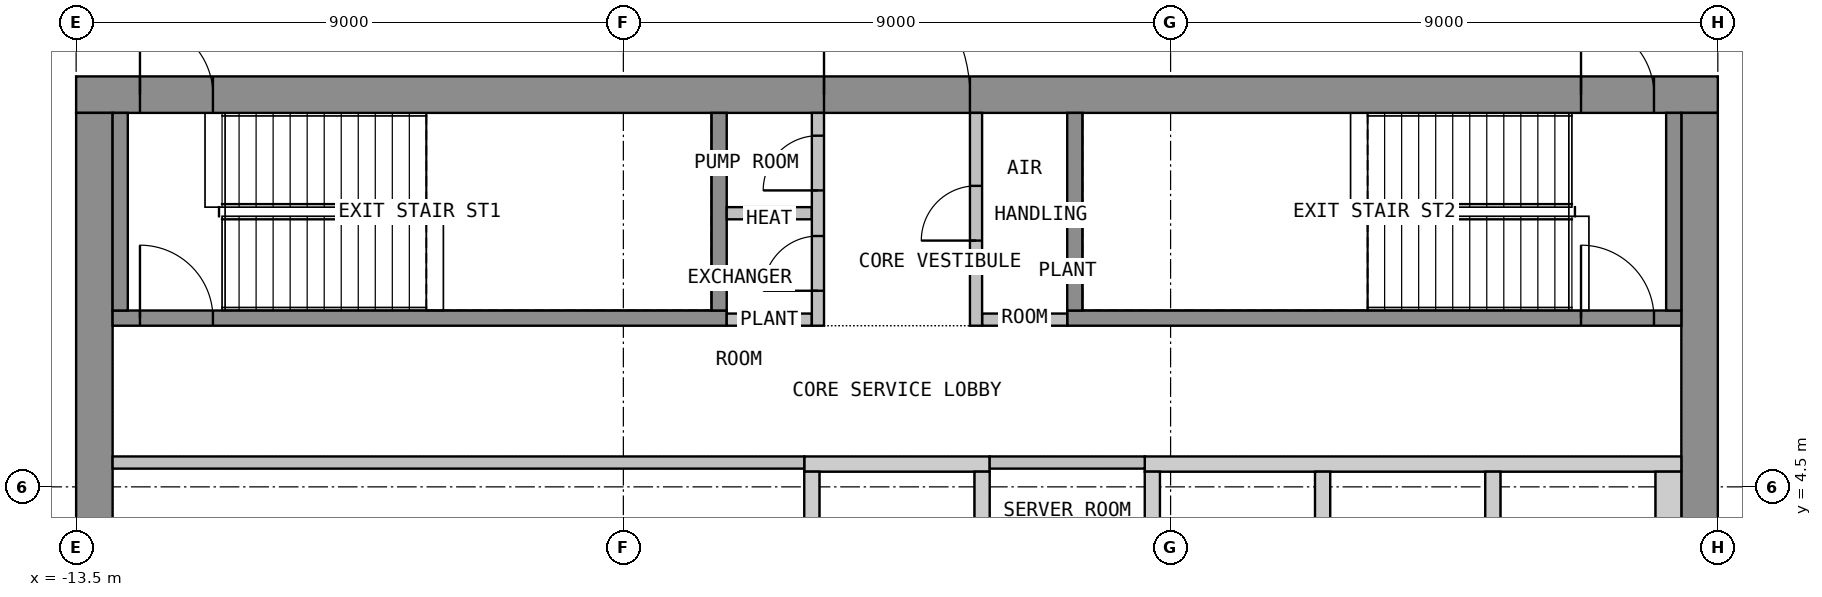
"""IFC4 building model, lengths in metres.
Left out: names, types, materials, properties, quantities, classifications, styles, units other than length and angle.
Written with IfcOpenShell. Run it as: python <this file> out.ifc"""

import sys

from ifc_helpers import new_model, si_unit, direction, frame, frame_2d, origin, place, context, subcontext, project, spatial, polyline, rectangle, outline, extrude, element, fill, save


model = new_model("IFC4")
c1 = context("Model", 3, precision=1e-05, world=origin(), true_north=direction((0.0, 1.0)))
c2 = subcontext(c1, "Body", "Model", "MODEL_VIEW")
j1 = project(units=[si_unit("LENGTHUNIT", "METRE"), si_unit("PLANEANGLEUNIT", "RADIAN")], contexts=[c1])
p1 = place(None, origin())
s1 = spatial("IfcSite", under=j1, at=p1, CompositionType="ELEMENT")
p2 = place(p1, origin())
s2 = spatial("IfcBuilding", under=s1, at=p2, CompositionType="ELEMENT")
p3 = place(p2, frame((0.0, 0.0, 179.4)))
s3 = spatial("IfcBuildingStorey", under=s2, at=p3, CompositionType="ELEMENT", Elevation=179.4)
p4 = place(p3, frame((-13.5, 10.95, 0.0), z_axis=(0.0, 0.0, 1.0), x_axis=(1.0, 0.0, 0.0)))
e1 = element("IfcWall", 1, at=p4, inside=s3, PredefinedType="SHEAR", context=c2, shape_type="SweptSolid", body=[
    extrude(rectangle(XDim=27.0, YDim=0.6, at=frame_2d((13.5, 0.0))), origin(), (0.0, 0.0, 1.0), 4.15),
])
p5 = place(p4, frame((12.3, 0.0, 0.0)))
e2 = element("IfcOpeningElement", 2, at=p5, cuts=e1, PredefinedType="OPENING", context=c2, shape_type="SweptSolid", body=[
    extrude(rectangle(XDim=2.4, YDim=2.1, at=frame_2d((1.2, 1.05))), frame((0.0, 0.31, 0.0), z_axis=(0.0, -1.0, 0.0), x_axis=(1.0, 0.0, 0.0)), (0.0, 0.0, 1.0), 0.62),
])
p6 = place(p4, frame((1.05, 0.0, 0.0)))
e3 = element("IfcOpeningElement", 3, at=p6, cuts=e1, PredefinedType="OPENING", context=c2, shape_type="SweptSolid", body=[
    extrude(rectangle(XDim=1.2, YDim=2.1, at=frame_2d((0.6, 1.05))), frame((0.0, 0.31, 0.0), z_axis=(0.0, -1.0, 0.0), x_axis=(1.0, 0.0, 0.0)), (0.0, 0.0, 1.0), 0.62),
])
p7 = place(p4, frame((24.75, 0.0, 0.0)))
e4 = element("IfcOpeningElement", 4, at=p7, cuts=e1, PredefinedType="OPENING", context=c2, shape_type="SweptSolid", body=[
    extrude(rectangle(XDim=1.2, YDim=2.1, at=frame_2d((0.6, 1.05))), frame((0.0, 0.31, 0.0), z_axis=(0.0, -1.0, 0.0), x_axis=(1.0, 0.0, 0.0)), (0.0, 0.0, 1.0), 0.62),
])
p8 = place(p3, frame((-13.2, -10.65, 0.0), z_axis=(0.0, 0.0, 1.0), x_axis=(0.0, 1.0, 0.0)))
e5 = element("IfcWall", 5, at=p8, inside=s3, PredefinedType="SHEAR", context=c2, shape_type="SweptSolid", body=[
    extrude(rectangle(XDim=21.3, YDim=0.6, at=frame_2d((10.65, 0.0))), origin(), (0.0, 0.0, 1.0), 4.15),
])
p9 = place(p8, frame((9.45, 0.0, 0.0)))
e6 = element("IfcOpeningElement", 6, at=p9, cuts=e5, PredefinedType="OPENING", context=c2, shape_type="SweptSolid", body=[
    extrude(rectangle(XDim=2.4, YDim=2.1, at=frame_2d((1.2, 1.05))), frame((0.0, 0.31, 0.0), z_axis=(0.0, -1.0, 0.0), x_axis=(1.0, 0.0, 0.0)), (0.0, 0.0, 1.0), 0.62),
])
p10 = place(p3, frame((13.2, -10.65, 0.0), z_axis=(0.0, 0.0, 1.0), x_axis=(0.0, 1.0, 0.0)))
e7 = element("IfcWall", 7, at=p10, inside=s3, PredefinedType="SHEAR", context=c2, shape_type="SweptSolid", body=[
    extrude(rectangle(XDim=21.3, YDim=0.6, at=frame_2d((10.65, 0.0))), origin(), (0.0, 0.0, 1.0), 4.15),
])
p11 = place(p10, frame((9.45, 0.0, 0.0)))
e8 = element("IfcOpeningElement", 8, at=p11, cuts=e7, PredefinedType="OPENING", context=c2, shape_type="SweptSolid", body=[
    extrude(rectangle(XDim=2.4, YDim=2.1, at=frame_2d((1.2, 1.05))), frame((0.0, 0.31, 0.0), z_axis=(0.0, -1.0, 0.0), x_axis=(1.0, 0.0, 0.0)), (0.0, 0.0, 1.0), 0.62),
])
p12 = place(p3, origin())
e9 = element("IfcWall", 9, at=p12, inside=s3, PredefinedType="SHEAR", context=c2, shape_type="SweptSolid", body=[
    extrude(outline(polyline([(-1.525, 4.75), (1.525, 4.75), (1.525, 5.0), (-1.525, 5.0), (-1.525, 4.75)])), origin(), (0.0, 0.0, 1.0), 4.15),
])
p13 = place(p3, origin())
e10 = element("IfcWall", 10, at=p13, inside=s3, PredefinedType="SHEAR", context=c2, shape_type="SweptSolid", body=[
    extrude(outline(polyline([(4.075, 4.75), (12.9, 4.75), (12.9, 5.0), (4.075, 5.0), (4.075, 4.75)])), origin(), (0.0, 0.0, 1.0), 4.15),
])
p14 = place(p3, origin())
e11 = element("IfcWall", 11, at=p14, inside=s3, PredefinedType="SHEAR", context=c2, shape_type="SweptSolid", body=[
    extrude(outline(polyline([(-1.525, 2.05), (-1.275, 2.05), (-1.275, 4.75), (-1.525, 4.75), (-1.525, 2.05)])), origin(), (0.0, 0.0, 1.0), 4.15),
])
p15 = place(p3, origin())
e12 = element("IfcWall", 12, at=p15, inside=s3, PredefinedType="SHEAR", context=c2, shape_type="SweptSolid", body=[
    extrude(outline(polyline([(1.275, 2.05), (1.525, 2.05), (1.525, 4.75), (1.275, 4.75), (1.275, 2.05)])), origin(), (0.0, 0.0, 1.0), 4.15),
])
p16 = place(p3, origin())
e13 = element("IfcWall", 13, at=p16, inside=s3, PredefinedType="SHEAR", context=c2, shape_type="SweptSolid", body=[
    extrude(outline(polyline([(9.675, 2.05), (9.925, 2.05), (9.925, 4.75), (9.675, 4.75), (9.675, 2.05)])), origin(), (0.0, 0.0, 1.0), 4.15),
])
p17 = place(p3, origin())
e14 = element("IfcWall", 14, at=p17, inside=s3, PredefinedType="SHEAR", context=c2, shape_type="SweptSolid", body=[
    extrude(outline(polyline([(12.475, 2.05), (12.9, 2.05), (12.9, 4.75), (12.475, 4.75), (12.475, 2.05)])), origin(), (0.0, 0.0, 1.0), 4.15),
])
p18 = place(p3, origin())
e15 = element("IfcWall", 15, at=p18, inside=s3, PredefinedType="SHEAR", context=c2, shape_type="SweptSolid", body=[
    extrude(outline(polyline([(4.075, 3.05), (4.325, 3.05), (4.325, 4.75), (4.075, 4.75), (4.075, 3.05)])), origin(), (0.0, 0.0, 1.0), 4.15),
])
p19 = place(p3, origin())
e16 = element("IfcWall", 16, at=p19, inside=s3, PredefinedType="SHEAR", context=c2, shape_type="SweptSolid", body=[
    extrude(outline(polyline([(6.875, 3.05), (7.125, 3.05), (7.125, 4.75), (6.875, 4.75), (6.875, 3.05)])), origin(), (0.0, 0.0, 1.0), 4.15),
])
p20 = place(p3, frame((-12.9, 7.275, 0.0), z_axis=(0.0, 0.0, 1.0), x_axis=(1.0, 0.0, 0.0)))
e17 = element("IfcWall", 17, at=p20, inside=s3, PredefinedType="SHEAR", context=c2, shape_type="SweptSolid", body=[
    extrude(rectangle(XDim=10.1, YDim=0.25, at=frame_2d((5.05, 0.0))), origin(), (0.0, 0.0, 1.0), 4.15),
])
p21 = place(p20, frame((0.45, 0.0, 0.0)))
e18 = element("IfcOpeningElement", 18, at=p21, cuts=e17, PredefinedType="OPENING", context=c2, shape_type="SweptSolid", body=[
    extrude(rectangle(XDim=1.2, YDim=2.1, at=frame_2d((0.6, 1.05))), frame((0.0, 0.135, 0.0), z_axis=(0.0, -1.0, 0.0), x_axis=(1.0, 0.0, 0.0)), (0.0, 0.0, 1.0), 0.27),
])
for number, where, z_axis, x_axis in (
    (19, (-12.775, 7.4, 0.0), (0.0, 0.0, 1.0), (0.0, 1.0, 0.0)),
    (20, (-2.925, 7.4, 0.0), (0.0, 0.0, 1.0), (0.0, 1.0, 0.0)),
):
    element("IfcWall", number, at=place(p3, frame(where, z_axis=z_axis, x_axis=x_axis)), inside=s3, PredefinedType="SHEAR", context=c2, shape_type="SweptSolid", body=[
        extrude(rectangle(XDim=3.25, YDim=0.25, at=frame_2d((1.625, 0.0))), origin(), (0.0, 0.0, 1.0), 4.15),
    ])
p22 = place(p3, frame((2.8, 7.275, 0.0), z_axis=(0.0, 0.0, 1.0), x_axis=(1.0, 0.0, 0.0)))
e21 = element("IfcWall", 21, at=p22, inside=s3, PredefinedType="SHEAR", context=c2, shape_type="SweptSolid", body=[
    extrude(rectangle(XDim=10.1, YDim=0.25, at=frame_2d((5.05, 0.0))), origin(), (0.0, 0.0, 1.0), 4.15),
])
p23 = place(p22, frame((8.45, 0.0, 0.0)))
e22 = element("IfcOpeningElement", 22, at=p23, cuts=e21, PredefinedType="OPENING", context=c2, shape_type="SweptSolid", body=[
    extrude(rectangle(XDim=1.2, YDim=2.1, at=frame_2d((0.6, 1.05))), frame((0.0, 0.135, 0.0), z_axis=(0.0, -1.0, 0.0), x_axis=(1.0, 0.0, 0.0)), (0.0, 0.0, 1.0), 0.27),
])
for number, where, z_axis, x_axis in (
    (23, (2.925, 7.4, 0.0), (0.0, 0.0, 1.0), (0.0, 1.0, 0.0)),
    (24, (12.775, 7.4, 0.0), (0.0, 0.0, 1.0), (0.0, 1.0, 0.0)),
):
    element("IfcWall", number, at=place(p3, frame(where, z_axis=z_axis, x_axis=x_axis)), inside=s3, PredefinedType="SHEAR", context=c2, shape_type="SweptSolid", body=[
        extrude(rectangle(XDim=3.25, YDim=0.25, at=frame_2d((1.625, 0.0))), origin(), (0.0, 0.0, 1.0), 4.15),
    ])
for number, where, z_axis, x_axis in (
    (25, (-2.8, 7.25, 0.0), (0.0, 0.0, 1.0), (1.0, 0.0, 0.0)),
    (26, (-2.8, 9.0, 0.0), (0.0, 0.0, 1.0), (1.0, 0.0, 0.0)),
    (27, (1.4, 7.25, 0.0), (0.0, 0.0, 1.0), (1.0, 0.0, 0.0)),
):
    element("IfcWall", number, at=place(p3, frame(where, z_axis=z_axis, x_axis=x_axis)), inside=s3, PredefinedType="PARTITIONING", context=c2, shape_type="SweptSolid", body=[
        extrude(rectangle(XDim=1.4, YDim=0.2, at=frame_2d((0.7, 0.0))), origin(), (0.0, 0.0, 1.0), 4.15),
    ])
p24 = place(p3, frame((-1.3, 7.15, 0.0), z_axis=(0.0, 0.0, 1.0), x_axis=(0.0, 1.0, 0.0)))
e28 = element("IfcWall", 28, at=p24, inside=s3, PredefinedType="PARTITIONING", context=c2, shape_type="SweptSolid", body=[
    extrude(rectangle(XDim=3.5, YDim=0.2, at=frame_2d((1.75, 0.0))), origin(), (0.0, 0.0, 1.0), 4.15),
])
p25 = place(p24, frame((0.575, 0.0, 0.0)))
e29 = element("IfcOpeningElement", 29, at=p25, cuts=e28, PredefinedType="OPENING", context=c2, shape_type="SweptSolid", body=[
    extrude(rectangle(XDim=0.9, YDim=2.1, at=frame_2d((0.45, 1.05))), frame((0.0, 0.11, 0.0), z_axis=(0.0, -1.0, 0.0), x_axis=(1.0, 0.0, 0.0)), (0.0, 0.0, 1.0), 0.22),
])
p26 = place(p24, frame((2.225, 0.0, 0.0)))
e30 = element("IfcOpeningElement", 30, at=p26, cuts=e28, PredefinedType="OPENING", context=c2, shape_type="SweptSolid", body=[
    extrude(rectangle(XDim=0.9, YDim=2.1, at=frame_2d((0.45, 1.05))), frame((0.0, 0.11, 0.0), z_axis=(0.0, -1.0, 0.0), x_axis=(1.0, 0.0, 0.0)), (0.0, 0.0, 1.0), 0.22),
])
p27 = place(p3, frame((1.3, 7.15, 0.0), z_axis=(0.0, 0.0, 1.0), x_axis=(0.0, 1.0, 0.0)))
e31 = element("IfcWall", 31, at=p27, inside=s3, PredefinedType="PARTITIONING", context=c2, shape_type="SweptSolid", body=[
    extrude(rectangle(XDim=3.5, YDim=0.2, at=frame_2d((1.75, 0.0))), origin(), (0.0, 0.0, 1.0), 4.15),
])
p28 = place(p27, frame((1.4, 0.0, 0.0)))
e32 = element("IfcOpeningElement", 32, at=p28, cuts=e31, PredefinedType="OPENING", context=c2, shape_type="SweptSolid", body=[
    extrude(rectangle(XDim=0.9, YDim=2.1, at=frame_2d((0.45, 1.05))), frame((0.0, 0.11, 0.0), z_axis=(0.0, -1.0, 0.0), x_axis=(1.0, 0.0, 0.0)), (0.0, 0.0, 1.0), 0.22),
])
p29 = place(p3, frame((-12.9, 4.9, 0.0), z_axis=(0.0, 0.0, 1.0), x_axis=(1.0, 0.0, 0.0)))
e33 = element("IfcWall", 33, at=p29, inside=s3, PredefinedType="PARTITIONING", context=c2, shape_type="SweptSolid", body=[
    extrude(rectangle(XDim=11.375, YDim=0.2, at=frame_2d((5.688, 0.0))), origin(), (0.0, 0.0, 1.0), 4.15),
])
p30 = place(p3, frame((1.525, 4.9, 0.0), z_axis=(0.0, 0.0, 1.0), x_axis=(1.0, 0.0, 0.0)))
e34 = element("IfcWall", 34, at=p30, inside=s3, PredefinedType="PARTITIONING", context=c2, shape_type="SweptSolid", body=[
    extrude(rectangle(XDim=2.55, YDim=0.2, at=frame_2d((1.275, 0.0))), origin(), (0.0, 0.0, 1.0), 4.15),
])
p31 = place(p5, origin())
e35 = element("IfcDoor", 35, at=p31, inside=s3, OperationType="DOUBLE_DOOR_DOUBLE_SWING", PredefinedType="DOOR", context=c2, shape_type="SweptSolid", body=[
    extrude(rectangle(XDim=2.4, YDim=2.1, at=frame_2d((1.2, 1.05))), frame((0.0, 0.025, 0.0), z_axis=(0.0, -1.0, 0.0), x_axis=(1.0, 0.0, 0.0)), (0.0, 0.0, 1.0), 0.05),
])
fill(e2, e35)
p32 = place(p6, origin())
e36 = element("IfcDoor", 36, at=p32, inside=s3, OperationType="SINGLE_SWING_RIGHT", PredefinedType="DOOR", context=c2, shape_type="SweptSolid", body=[
    extrude(rectangle(XDim=1.2, YDim=2.1, at=frame_2d((0.6, 1.05))), frame((0.0, 0.025, 0.0), z_axis=(0.0, -1.0, 0.0), x_axis=(1.0, 0.0, 0.0)), (0.0, 0.0, 1.0), 0.05),
])
fill(e3, e36)
p33 = place(p7, origin())
e37 = element("IfcDoor", 37, at=p33, inside=s3, OperationType="SINGLE_SWING_RIGHT", PredefinedType="DOOR", context=c2, shape_type="SweptSolid", body=[
    extrude(rectangle(XDim=1.2, YDim=2.1, at=frame_2d((0.6, 1.05))), frame((0.0, 0.025, 0.0), z_axis=(0.0, -1.0, 0.0), x_axis=(1.0, 0.0, 0.0)), (0.0, 0.0, 1.0), 0.05),
])
fill(e4, e37)
p34 = place(p21, origin())
e38 = element("IfcDoor", 38, at=p34, inside=s3, OperationType="SINGLE_SWING_LEFT", PredefinedType="DOOR", context=c2, shape_type="SweptSolid", body=[
    extrude(rectangle(XDim=1.2, YDim=2.1, at=frame_2d((0.6, 1.05))), frame((0.0, 0.025, 0.0), z_axis=(0.0, -1.0, 0.0), x_axis=(1.0, 0.0, 0.0)), (0.0, 0.0, 1.0), 0.05),
])
fill(e18, e38)
p35 = place(p23, origin())
e39 = element("IfcDoor", 39, at=p35, inside=s3, OperationType="SINGLE_SWING_LEFT", PredefinedType="DOOR", context=c2, shape_type="SweptSolid", body=[
    extrude(rectangle(XDim=1.2, YDim=2.1, at=frame_2d((0.6, 1.05))), frame((0.0, 0.025, 0.0), z_axis=(0.0, -1.0, 0.0), x_axis=(1.0, 0.0, 0.0)), (0.0, 0.0, 1.0), 0.05),
])
fill(e22, e39)
p36 = place(p25, origin())
e40 = element("IfcDoor", 40, at=p36, inside=s3, OperationType="SINGLE_SWING_LEFT", PredefinedType="DOOR", context=c2, shape_type="SweptSolid", body=[
    extrude(rectangle(XDim=0.9, YDim=2.1, at=frame_2d((0.45, 1.05))), frame((0.0, 0.025, 0.0), z_axis=(0.0, -1.0, 0.0), x_axis=(1.0, 0.0, 0.0)), (0.0, 0.0, 1.0), 0.05),
])
fill(e29, e40)
p37 = place(p26, origin())
e41 = element("IfcDoor", 41, at=p37, inside=s3, OperationType="SINGLE_SWING_LEFT", PredefinedType="DOOR", context=c2, shape_type="SweptSolid", body=[
    extrude(rectangle(XDim=0.9, YDim=2.1, at=frame_2d((0.45, 1.05))), frame((0.0, 0.025, 0.0), z_axis=(0.0, -1.0, 0.0), x_axis=(1.0, 0.0, 0.0)), (0.0, 0.0, 1.0), 0.05),
])
fill(e30, e41)
p38 = place(p28, origin())
e42 = element("IfcDoor", 42, at=p38, inside=s3, OperationType="SINGLE_SWING_LEFT", PredefinedType="DOOR", context=c2, shape_type="SweptSolid", body=[
    extrude(rectangle(XDim=0.9, YDim=2.1, at=frame_2d((0.45, 1.05))), frame((0.0, 0.025, 0.0), z_axis=(0.0, -1.0, 0.0), x_axis=(1.0, 0.0, 0.0)), (0.0, 0.0, 1.0), 0.05),
])
fill(e32, e42)
save(model, sys.argv[1])
